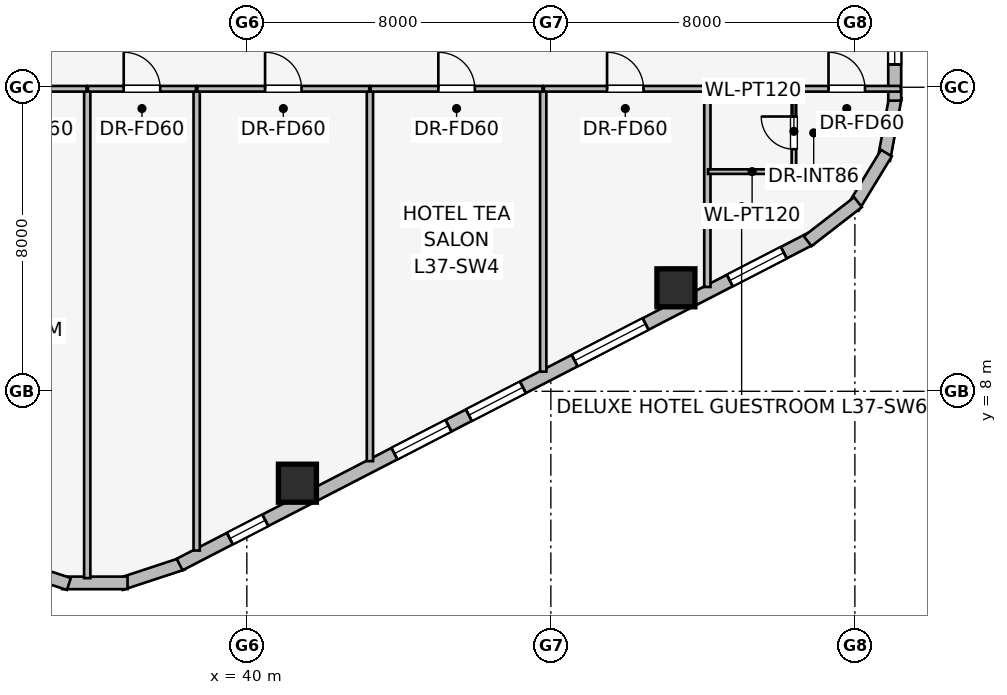
"""IFC4 building model, lengths in metres.
Left out: names, types, materials, properties, quantities, classifications, styles, units other than length and angle.
Written with IfcOpenShell. Run it as: python <this file> out.ifc"""

import sys

from ifc_helpers import new_model, si_unit, direction, frame, frame_2d, origin, origin_2d, place, context, subcontext, project, spatial, rectangle, extrude, element, fill, save


model = new_model("IFC4")
c1 = context("Model", 3, precision=1e-05, world=origin(), true_north=direction((0.0, 1.0)))
c2 = subcontext(c1, "Body", "Model", "MODEL_VIEW")
j1 = project(units=[si_unit("LENGTHUNIT", "METRE"), si_unit("PLANEANGLEUNIT", "RADIAN")], contexts=[c1])
p1 = place(None, origin())
s1 = spatial("IfcSite", under=j1, at=p1, CompositionType="ELEMENT")
p2 = place(p1, origin())
s2 = spatial("IfcBuilding", under=s1, at=p2, CompositionType="ELEMENT")
p3 = place(p2, frame((0.0, 0.0, 139.5)))
s3 = spatial("IfcBuildingStorey", under=s2, at=p3, CompositionType="ELEMENT", Elevation=139.5)
for number, where, z_axis, x_axis in (
    (1, (41.331, 5.582, 0.0), (0.0, 0.0, 1.0), (1.0, 0.0, 0.0)),
    (2, (51.291, 10.723, 0.0), (0.0, 0.0, 1.0), (1.0, 0.0, 0.0)),
):
    element("IfcColumn", number, at=place(p3, frame(where, z_axis=z_axis, x_axis=x_axis)), inside=s3, PredefinedType="COLUMN", context=c2, shape_type="SweptSolid", body=[
        extrude(rectangle(XDim=1.0, YDim=1.0, at=origin_2d()), origin(), (0.0, 0.0, 1.0), 3.45),
    ])
for number, where, z_axis, x_axis in (
    (3, (38.319, 3.468, 0.0), (0.0, 0.0, 1.0), (-0.95, -0.312, 0.0)),
    (4, (36.861, 2.959, 0.0), (0.0, 0.0, 1.0), (-1.0, 0.0, 0.0)),
    (5, (35.317, 2.93, 0.0), (0.0, 0.0, 1.0), (-0.95, 0.312, 0.0)),
):
    element("IfcWall", number, at=place(p3, frame(where, z_axis=z_axis, x_axis=x_axis)), inside=s3, PredefinedType="STANDARD", context=c2, shape_type="SweptSolid", body=[
        extrude(rectangle(XDim=1.722, YDim=0.33, at=frame_2d((0.861, 0.0))), origin(), (0.0, 0.0, 1.0), 3.16),
    ])
p4 = place(p3, frame((54.831, 12.01, 0.0), z_axis=(0.0, 0.0, 1.0), x_axis=(-0.888613612362, -0.458656568606, 0.0)))
e6 = element("IfcWall", 6, at=p4, inside=s3, PredefinedType="STANDARD", context=c2, shape_type="SweptSolid", body=[
    extrude(rectangle(XDim=18.681, YDim=0.34, at=frame_2d((9.34, 0.0))), origin(), (0.0, 0.0, 1.0), 3.16),
])
p5 = place(p4, frame((0.789, 0.0, 0.75)))
e7 = element("IfcOpeningElement", 7, at=p5, cuts=e6, PredefinedType="OPENING", context=c2, shape_type="SweptSolid", body=[
    extrude(rectangle(XDim=1.6, YDim=1.55, at=frame_2d((0.8, 0.775))), frame((0.0, 0.18, 0.0), z_axis=(0.0, -1.0, 0.0), x_axis=(1.0, 0.0, 0.0)), (0.0, 0.0, 1.0), 0.36),
])
p6 = place(p4, frame((4.882, 0.0, 0.75)))
e8 = element("IfcOpeningElement", 8, at=p6, cuts=e6, PredefinedType="OPENING", context=c2, shape_type="SweptSolid", body=[
    extrude(rectangle(XDim=2.1, YDim=1.5, at=frame_2d((1.05, 0.75))), frame((0.0, 0.18, 0.0), z_axis=(0.0, -1.0, 0.0), x_axis=(1.0, 0.0, 0.0)), (0.0, 0.0, 1.0), 0.36),
])
p7 = place(p4, frame((8.515, 0.0, 0.75)))
e9 = element("IfcOpeningElement", 9, at=p7, cuts=e6, PredefinedType="OPENING", context=c2, shape_type="SweptSolid", body=[
    extrude(rectangle(XDim=1.6, YDim=1.55, at=frame_2d((0.8, 0.775))), frame((0.0, 0.18, 0.0), z_axis=(0.0, -1.0, 0.0), x_axis=(1.0, 0.0, 0.0)), (0.0, 0.0, 1.0), 0.36),
])
p8 = place(p4, frame((10.719, 0.0, 0.75)))
e10 = element("IfcOpeningElement", 10, at=p8, cuts=e6, PredefinedType="OPENING", context=c2, shape_type="SweptSolid", body=[
    extrude(rectangle(XDim=1.6, YDim=1.55, at=frame_2d((0.8, 0.775))), frame((0.0, 0.18, 0.0), z_axis=(0.0, -1.0, 0.0), x_axis=(1.0, 0.0, 0.0)), (0.0, 0.0, 1.0), 0.36),
])
p9 = place(p4, frame((16.143, 0.0, 0.75)))
e11 = element("IfcOpeningElement", 11, at=p9, cuts=e6, PredefinedType="OPENING", context=c2, shape_type="SweptSolid", body=[
    extrude(rectangle(XDim=1.05, YDim=1.4, at=frame_2d((0.525, 0.7))), frame((0.0, 0.18, 0.0), z_axis=(0.0, -1.0, 0.0), x_axis=(1.0, 0.0, 0.0)), (0.0, 0.0, 1.0), 0.36),
])
p10 = place(p3, frame((57.068, 15.742, 0.0), z_axis=(0.0, 0.0, 1.0), x_axis=(-0.181984991895, -0.983301308209, 0.0)))
e12 = element("IfcWall", 12, at=p10, inside=s3, PredefinedType="STANDARD", context=c2, shape_type="SweptSolid", body=[
    extrude(rectangle(XDim=1.677, YDim=0.33, at=frame_2d((0.838, 0.0))), origin(), (0.0, 0.0, 1.0), 3.16),
])
p11 = place(p3, frame((56.83, 14.268, 0.0), z_axis=(0.0, 0.0, 1.0), x_axis=(-0.520519429557, -0.853849824883, 0.0)))
e13 = element("IfcWall", 13, at=p11, inside=s3, PredefinedType="STANDARD", context=c2, shape_type="SweptSolid", body=[
    extrude(rectangle(XDim=1.677, YDim=0.33, at=frame_2d((0.839, 0.0))), origin(), (0.0, 0.0, 1.0), 3.16),
])
p12 = place(p3, frame((56.082, 12.976, 0.0), z_axis=(0.0, 0.0, 1.0), x_axis=(-0.790621329885, -0.612305408053, 0.0)))
e14 = element("IfcWall", 14, at=p12, inside=s3, PredefinedType="STANDARD", context=c2, shape_type="SweptSolid", body=[
    extrude(rectangle(XDim=1.676, YDim=0.33, at=frame_2d((0.838, 0.0))), origin(), (0.0, 0.0, 1.0), 3.16),
])
p13 = place(p3, frame((57.048, 32.352, 0.0), z_axis=(0.0, 0.0, 1.0), x_axis=(0.0, -1.0, 0.0)))
e15 = element("IfcWall", 15, at=p13, inside=s3, PredefinedType="STANDARD", context=c2, shape_type="SweptSolid", body=[
    extrude(rectangle(XDim=16.704, YDim=0.34, at=frame_2d((8.352, 0.0))), origin(), (0.0, 0.0, 1.0), 3.16),
])
p14 = place(p13, frame((0.992, 0.0, 0.75)))
e16 = element("IfcOpeningElement", 16, at=p14, cuts=e15, PredefinedType="OPENING", context=c2, shape_type="SweptSolid", body=[
    extrude(rectangle(XDim=1.05, YDim=1.4, at=frame_2d((0.525, 0.7))), frame((0.0, 0.18, 0.0), z_axis=(0.0, -1.0, 0.0), x_axis=(1.0, 0.0, 0.0)), (0.0, 0.0, 1.0), 0.36),
])
p15 = place(p13, frame((4.935, 0.0, 0.75)))
e17 = element("IfcOpeningElement", 17, at=p15, cuts=e15, PredefinedType="OPENING", context=c2, shape_type="SweptSolid", body=[
    extrude(rectangle(XDim=2.1, YDim=1.5, at=frame_2d((1.05, 0.75))), frame((0.0, 0.18, 0.0), z_axis=(0.0, -1.0, 0.0), x_axis=(1.0, 0.0, 0.0)), (0.0, 0.0, 1.0), 0.36),
])
p16 = place(p13, frame((9.919, 0.0, 0.75)))
e18 = element("IfcOpeningElement", 18, at=p16, cuts=e15, PredefinedType="OPENING", context=c2, shape_type="SweptSolid", body=[
    extrude(rectangle(XDim=1.6, YDim=1.55, at=frame_2d((0.8, 0.775))), frame((0.0, 0.18, 0.0), z_axis=(0.0, -1.0, 0.0), x_axis=(1.0, 0.0, 0.0)), (0.0, 0.0, 1.0), 0.36),
])
p17 = place(p13, frame((14.702, 0.0, 0.75)))
e19 = element("IfcOpeningElement", 19, at=p17, cuts=e15, PredefinedType="OPENING", context=c2, shape_type="SweptSolid", body=[
    extrude(rectangle(XDim=1.05, YDim=1.4, at=frame_2d((0.525, 0.7))), frame((0.0, 0.18, 0.0), z_axis=(0.0, -1.0, 0.0), x_axis=(1.0, 0.0, 0.0)), (0.0, 0.0, 1.0), 0.36),
])
p18 = place(p3, frame((35.8, 3.084, 0.0), z_axis=(0.0, 0.0, 1.0), x_axis=(0.0, 1.0, 0.0)))
e20 = element("IfcWall", 20, at=p18, inside=s3, PredefinedType="PARTITIONING", context=c2, shape_type="SweptSolid", body=[
    extrude(rectangle(XDim=12.846, YDim=0.165, at=frame_2d((6.423, 0.0))), origin(), (0.0, 0.0, 1.0), 3.16),
])
p19 = place(p3, frame((38.68, 3.809, 0.0), z_axis=(0.0, 0.0, 1.0), x_axis=(0.0, 1.0, 0.0)))
e21 = element("IfcWall", 21, at=p19, inside=s3, PredefinedType="PARTITIONING", context=c2, shape_type="SweptSolid", body=[
    extrude(rectangle(XDim=12.121, YDim=0.165, at=frame_2d((6.061, 0.0))), origin(), (0.0, 0.0, 1.0), 3.16),
])
p20 = place(p3, frame((43.239, 6.162, 0.0), z_axis=(0.0, 0.0, 1.0), x_axis=(0.0, 1.0, 0.0)))
e22 = element("IfcWall", 22, at=p20, inside=s3, PredefinedType="PARTITIONING", context=c2, shape_type="SweptSolid", body=[
    extrude(rectangle(XDim=9.768, YDim=0.165, at=frame_2d((4.884, 0.0))), origin(), (0.0, 0.0, 1.0), 3.16),
])
p21 = place(p3, frame((47.799, 8.516, 0.0), z_axis=(0.0, 0.0, 1.0), x_axis=(0.0, 1.0, 0.0)))
e23 = element("IfcWall", 23, at=p21, inside=s3, PredefinedType="PARTITIONING", context=c2, shape_type="SweptSolid", body=[
    extrude(rectangle(XDim=7.414, YDim=0.165, at=frame_2d((3.707, 0.0))), origin(), (0.0, 0.0, 1.0), 3.16),
])
p22 = place(p3, frame((52.118, 10.745, 0.0), z_axis=(0.0, 0.0, 1.0), x_axis=(0.0, 1.0, 0.0)))
e24 = element("IfcWall", 24, at=p22, inside=s3, PredefinedType="PARTITIONING", context=c2, shape_type="SweptSolid", body=[
    extrude(rectangle(XDim=5.185, YDim=0.165, at=frame_2d((2.592, 0.0))), origin(), (0.0, 0.0, 1.0), 3.16),
])
p23 = place(p3, frame((32.85, 15.96, 0.0), z_axis=(0.0, 0.0, 1.0), x_axis=(1.0, 0.0, 0.0)))
e25 = element("IfcWall", 25, at=p23, inside=s3, PredefinedType="PARTITIONING", context=c2, shape_type="SweptSolid", body=[
    extrude(rectangle(XDim=2.932, YDim=0.15, at=frame_2d((1.466, 0.0))), origin(), (0.0, 0.0, 1.0), 3.16),
])
p24 = place(p23, frame((0.986, 0.0, 0.0)))
e26 = element("IfcOpeningElement", 26, at=p24, cuts=e25, PredefinedType="OPENING", context=c2, shape_type="SweptSolid", body=[
    extrude(rectangle(XDim=0.96, YDim=2.0, at=frame_2d((0.48, 1.0))), frame((0.0, 0.085, 0.0), z_axis=(0.0, -1.0, 0.0), x_axis=(1.0, 0.0, 0.0)), (0.0, 0.0, 1.0), 0.17),
])
p25 = place(p3, frame((35.818, 15.96, 0.0), z_axis=(0.0, 0.0, 1.0), x_axis=(1.0, 0.0, 0.0)))
e27 = element("IfcWall", 27, at=p25, inside=s3, PredefinedType="PARTITIONING", context=c2, shape_type="SweptSolid", body=[
    extrude(rectangle(XDim=2.844, YDim=0.15, at=frame_2d((1.422, 0.0))), origin(), (0.0, 0.0, 1.0), 3.16),
])
p26 = place(p25, frame((0.942, 0.0, 0.0)))
e28 = element("IfcOpeningElement", 28, at=p26, cuts=e27, PredefinedType="OPENING", context=c2, shape_type="SweptSolid", body=[
    extrude(rectangle(XDim=0.96, YDim=2.0, at=frame_2d((0.48, 1.0))), frame((0.0, 0.085, 0.0), z_axis=(0.0, -1.0, 0.0), x_axis=(1.0, 0.0, 0.0)), (0.0, 0.0, 1.0), 0.17),
])
p27 = place(p3, frame((38.698, 15.96, 0.0), z_axis=(0.0, 0.0, 1.0), x_axis=(1.0, 0.0, 0.0)))
e29 = element("IfcWall", 29, at=p27, inside=s3, PredefinedType="PARTITIONING", context=c2, shape_type="SweptSolid", body=[
    extrude(rectangle(XDim=4.523, YDim=0.15, at=frame_2d((2.261, 0.0))), origin(), (0.0, 0.0, 1.0), 3.16),
])
p28 = place(p27, frame((1.782, 0.0, 0.0)))
e30 = element("IfcOpeningElement", 30, at=p28, cuts=e29, PredefinedType="OPENING", context=c2, shape_type="SweptSolid", body=[
    extrude(rectangle(XDim=0.96, YDim=2.0, at=frame_2d((0.48, 1.0))), frame((0.0, 0.085, 0.0), z_axis=(0.0, -1.0, 0.0), x_axis=(1.0, 0.0, 0.0)), (0.0, 0.0, 1.0), 0.17),
])
p29 = place(p3, frame((43.257, 15.96, 0.0), z_axis=(0.0, 0.0, 1.0), x_axis=(1.0, 0.0, 0.0)))
e31 = element("IfcWall", 31, at=p29, inside=s3, PredefinedType="PARTITIONING", context=c2, shape_type="SweptSolid", body=[
    extrude(rectangle(XDim=4.524, YDim=0.15, at=frame_2d((2.262, 0.0))), origin(), (0.0, 0.0, 1.0), 3.16),
])
p30 = place(p29, frame((1.782, 0.0, 0.0)))
e32 = element("IfcOpeningElement", 32, at=p30, cuts=e31, PredefinedType="OPENING", context=c2, shape_type="SweptSolid", body=[
    extrude(rectangle(XDim=0.96, YDim=2.0, at=frame_2d((0.48, 1.0))), frame((0.0, 0.085, 0.0), z_axis=(0.0, -1.0, 0.0), x_axis=(1.0, 0.0, 0.0)), (0.0, 0.0, 1.0), 0.17),
])
p31 = place(p3, frame((47.817, 15.96, 0.0), z_axis=(0.0, 0.0, 1.0), x_axis=(1.0, 0.0, 0.0)))
e33 = element("IfcWall", 33, at=p31, inside=s3, PredefinedType="PARTITIONING", context=c2, shape_type="SweptSolid", body=[
    extrude(rectangle(XDim=4.283, YDim=0.15, at=frame_2d((2.142, 0.0))), origin(), (0.0, 0.0, 1.0), 3.16),
])
p32 = place(p31, frame((1.662, 0.0, 0.0)))
e34 = element("IfcOpeningElement", 34, at=p32, cuts=e33, PredefinedType="OPENING", context=c2, shape_type="SweptSolid", body=[
    extrude(rectangle(XDim=0.96, YDim=2.0, at=frame_2d((0.48, 1.0))), frame((0.0, 0.085, 0.0), z_axis=(0.0, -1.0, 0.0), x_axis=(1.0, 0.0, 0.0)), (0.0, 0.0, 1.0), 0.17),
])
p33 = place(p3, frame((54.396, 13.72, 0.0), z_axis=(0.0, 0.0, 1.0), x_axis=(0.0, 1.0, 0.0)))
e35 = element("IfcWall", 35, at=p33, inside=s3, PredefinedType="PARTITIONING", context=c2, shape_type="SweptSolid", body=[
    extrude(rectangle(XDim=2.24, YDim=0.12, at=frame_2d((1.12, 0.0))), origin(), (0.0, 0.0, 1.0), 3.16),
])
p34 = place(p33, frame((0.65, 0.0, 0.0)))
e36 = element("IfcOpeningElement", 36, at=p34, cuts=e35, PredefinedType="OPENING", context=c2, shape_type="SweptSolid", body=[
    extrude(rectangle(XDim=0.86, YDim=2.0, at=frame_2d((0.43, 1.0))), frame((0.0, 0.07, 0.0), z_axis=(0.0, -1.0, 0.0), x_axis=(1.0, 0.0, 0.0)), (0.0, 0.0, 1.0), 0.14),
])
p35 = place(p3, frame((52.136, 13.78, 0.0), z_axis=(0.0, 0.0, 1.0), x_axis=(1.0, 0.0, 0.0)))
e37 = element("IfcWall", 37, at=p35, inside=s3, PredefinedType="PARTITIONING", context=c2, shape_type="SweptSolid", body=[
    extrude(rectangle(XDim=2.32, YDim=0.12, at=frame_2d((1.16, 0.0))), origin(), (0.0, 0.0, 1.0), 3.16),
])
p36 = place(p3, frame((52.136, 15.96, 0.0), z_axis=(0.0, 0.0, 1.0), x_axis=(1.0, 0.0, 0.0)))
e38 = element("IfcWall", 38, at=p36, inside=s3, PredefinedType="PARTITIONING", context=c2, shape_type="SweptSolid", body=[
    extrude(rectangle(XDim=5.072, YDim=0.15, at=frame_2d((2.536, 0.0))), origin(), (0.0, 0.0, 1.0), 3.16),
])
p37 = place(p36, frame((3.17, 0.0, 0.0)))
e39 = element("IfcOpeningElement", 39, at=p37, cuts=e38, PredefinedType="OPENING", context=c2, shape_type="SweptSolid", body=[
    extrude(rectangle(XDim=0.96, YDim=2.0, at=frame_2d((0.48, 1.0))), frame((0.0, 0.085, 0.0), z_axis=(0.0, -1.0, 0.0), x_axis=(1.0, 0.0, 0.0)), (0.0, 0.0, 1.0), 0.17),
])
p38 = place(p5, origin())
e40 = element("IfcWindow", 40, at=p38, inside=s3, PartitioningType="SINGLE_PANEL", PredefinedType="WINDOW", context=c2, shape_type="SweptSolid", body=[
    extrude(rectangle(XDim=1.6, YDim=1.55, at=frame_2d((0.8, 0.775))), frame((0.0, 0.03, 0.0), z_axis=(0.0, -1.0, 0.0), x_axis=(1.0, 0.0, 0.0)), (0.0, 0.0, 1.0), 0.06),
])
fill(e7, e40)
p39 = place(p6, origin())
e41 = element("IfcWindow", 41, at=p39, inside=s3, PartitioningType="SINGLE_PANEL", PredefinedType="WINDOW", context=c2, shape_type="SweptSolid", body=[
    extrude(rectangle(XDim=2.1, YDim=1.5, at=frame_2d((1.05, 0.75))), frame((0.0, 0.03, 0.0), z_axis=(0.0, -1.0, 0.0), x_axis=(1.0, 0.0, 0.0)), (0.0, 0.0, 1.0), 0.06),
])
fill(e8, e41)
p40 = place(p7, origin())
e42 = element("IfcWindow", 42, at=p40, inside=s3, PartitioningType="SINGLE_PANEL", PredefinedType="WINDOW", context=c2, shape_type="SweptSolid", body=[
    extrude(rectangle(XDim=1.6, YDim=1.55, at=frame_2d((0.8, 0.775))), frame((0.0, 0.03, 0.0), z_axis=(0.0, -1.0, 0.0), x_axis=(1.0, 0.0, 0.0)), (0.0, 0.0, 1.0), 0.06),
])
fill(e9, e42)
p41 = place(p8, origin())
e43 = element("IfcWindow", 43, at=p41, inside=s3, PartitioningType="SINGLE_PANEL", PredefinedType="WINDOW", context=c2, shape_type="SweptSolid", body=[
    extrude(rectangle(XDim=1.6, YDim=1.55, at=frame_2d((0.8, 0.775))), frame((0.0, 0.03, 0.0), z_axis=(0.0, -1.0, 0.0), x_axis=(1.0, 0.0, 0.0)), (0.0, 0.0, 1.0), 0.06),
])
fill(e10, e43)
p42 = place(p9, origin())
e44 = element("IfcWindow", 44, at=p42, inside=s3, PartitioningType="SINGLE_PANEL", PredefinedType="WINDOW", context=c2, shape_type="SweptSolid", body=[
    extrude(rectangle(XDim=1.05, YDim=1.4, at=frame_2d((0.525, 0.7))), frame((0.0, 0.03, 0.0), z_axis=(0.0, -1.0, 0.0), x_axis=(1.0, 0.0, 0.0)), (0.0, 0.0, 1.0), 0.06),
])
fill(e11, e44)
p43 = place(p17, origin())
e45 = element("IfcWindow", 45, at=p43, inside=s3, PartitioningType="SINGLE_PANEL", PredefinedType="WINDOW", context=c2, shape_type="SweptSolid", body=[
    extrude(rectangle(XDim=1.05, YDim=1.4, at=frame_2d((0.525, 0.7))), frame((0.0, 0.03, 0.0), z_axis=(0.0, -1.0, 0.0), x_axis=(1.0, 0.0, 0.0)), (0.0, 0.0, 1.0), 0.06),
])
fill(e19, e45)
p44 = place(p26, origin())
e46 = element("IfcDoor", 46, at=p44, inside=s3, OperationType="SINGLE_SWING_LEFT", PredefinedType="DOOR", context=c2, shape_type="SweptSolid", body=[
    extrude(rectangle(XDim=0.96, YDim=2.0, at=frame_2d((0.48, 1.0))), frame((0.0, 0.025, 0.0), z_axis=(0.0, -1.0, 0.0), x_axis=(1.0, 0.0, 0.0)), (0.0, 0.0, 1.0), 0.05),
])
fill(e28, e46)
p45 = place(p28, origin())
e47 = element("IfcDoor", 47, at=p45, inside=s3, OperationType="SINGLE_SWING_LEFT", PredefinedType="DOOR", context=c2, shape_type="SweptSolid", body=[
    extrude(rectangle(XDim=0.96, YDim=2.0, at=frame_2d((0.48, 1.0))), frame((0.0, 0.025, 0.0), z_axis=(0.0, -1.0, 0.0), x_axis=(1.0, 0.0, 0.0)), (0.0, 0.0, 1.0), 0.05),
])
fill(e30, e47)
p46 = place(p30, origin())
e48 = element("IfcDoor", 48, at=p46, inside=s3, OperationType="SINGLE_SWING_LEFT", PredefinedType="DOOR", context=c2, shape_type="SweptSolid", body=[
    extrude(rectangle(XDim=0.96, YDim=2.0, at=frame_2d((0.48, 1.0))), frame((0.0, 0.025, 0.0), z_axis=(0.0, -1.0, 0.0), x_axis=(1.0, 0.0, 0.0)), (0.0, 0.0, 1.0), 0.05),
])
fill(e32, e48)
p47 = place(p32, origin())
e49 = element("IfcDoor", 49, at=p47, inside=s3, OperationType="SINGLE_SWING_LEFT", PredefinedType="DOOR", context=c2, shape_type="SweptSolid", body=[
    extrude(rectangle(XDim=0.96, YDim=2.0, at=frame_2d((0.48, 1.0))), frame((0.0, 0.025, 0.0), z_axis=(0.0, -1.0, 0.0), x_axis=(1.0, 0.0, 0.0)), (0.0, 0.0, 1.0), 0.05),
])
fill(e34, e49)
p48 = place(p34, origin())
e50 = element("IfcDoor", 50, at=p48, inside=s3, OperationType="SINGLE_SWING_RIGHT", PredefinedType="DOOR", context=c2, shape_type="SweptSolid", body=[
    extrude(rectangle(XDim=0.86, YDim=2.0, at=frame_2d((0.43, 1.0))), frame((0.0, 0.025, 0.0), z_axis=(0.0, -1.0, 0.0), x_axis=(1.0, 0.0, 0.0)), (0.0, 0.0, 1.0), 0.05),
])
fill(e36, e50)
p49 = place(p37, origin())
e51 = element("IfcDoor", 51, at=p49, inside=s3, OperationType="SINGLE_SWING_LEFT", PredefinedType="DOOR", context=c2, shape_type="SweptSolid", body=[
    extrude(rectangle(XDim=0.96, YDim=2.0, at=frame_2d((0.48, 1.0))), frame((0.0, 0.025, 0.0), z_axis=(0.0, -1.0, 0.0), x_axis=(1.0, 0.0, 0.0)), (0.0, 0.0, 1.0), 0.05),
])
fill(e39, e51)
save(model, sys.argv[1])
